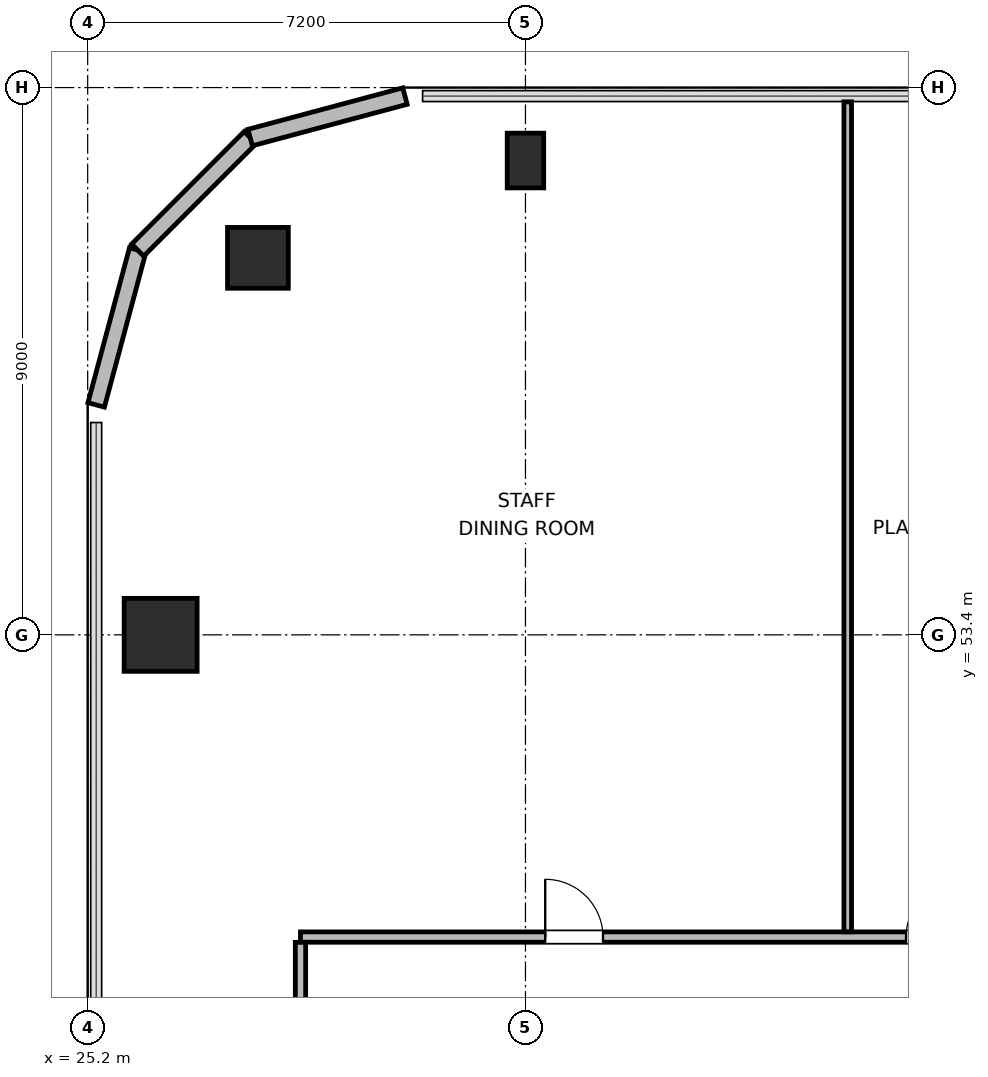
"""IFC4 building model, lengths in metres.
Left out: names, types, materials, properties, quantities, classifications, styles, units other than length and angle.
Written with IfcOpenShell. Run it as: python <this file> out.ifc"""

import sys

from ifc_helpers import new_model, si_unit, direction, frame, frame_2d, origin, origin_2d, place, context, subcontext, project, spatial, rectangle, circle, extrude, element, fill, save


model = new_model("IFC4")
c1 = context("Model", 3, precision=1e-05, world=origin(), true_north=direction((0.0, 1.0)))
c2 = subcontext(c1, "Body", "Model", "MODEL_VIEW")
j1 = project(units=[si_unit("LENGTHUNIT", "METRE"), si_unit("PLANEANGLEUNIT", "RADIAN")], contexts=[c1])
p1 = place(None, origin())
s1 = spatial("IfcSite", under=j1, at=p1, CompositionType="ELEMENT")
p2 = place(p1, origin())
s2 = spatial("IfcBuilding", under=s1, at=p2, CompositionType="ELEMENT")
p3 = place(p2, frame((0.0, 0.0, 223.2)))
s3 = spatial("IfcBuildingStorey", under=s2, at=p3, CompositionType="ELEMENT", Elevation=223.2)
p4 = place(p3, frame((28.0, 59.6, 0.0), z_axis=(0.0, 0.0, 1.0), x_axis=(1.0, 0.0, 0.0)))
e1 = element("IfcColumn", 1, at=p4, inside=s3, PredefinedType="COLUMN", context=c2, shape_type="SweptSolid", body=[
    extrude(circle(Radius=0.5, at=origin_2d()), origin(), (0.0, 0.0, 1.0), 3.9),
])
p5 = place(p3, frame((32.4, 61.2, 0.0), z_axis=(0.0, 0.0, 1.0), x_axis=(1.0, 0.0, 0.0)))
e2 = element("IfcColumn", 2, at=p5, inside=s3, PredefinedType="COLUMN", context=c2, shape_type="SweptSolid", body=[
    extrude(rectangle(XDim=0.6, YDim=0.9, at=origin_2d()), origin(), (0.0, 0.0, 1.0), 3.9),
])
p6 = place(p3, frame((26.4, 53.4, 0.0), z_axis=(0.0, 0.0, 1.0), x_axis=(1.0, 0.0, 0.0)))
e3 = element("IfcColumn", 3, at=p6, inside=s3, PredefinedType="COLUMN", context=c2, shape_type="SweptSolid", body=[
    extrude(rectangle(XDim=1.2, YDim=1.2, at=origin_2d()), origin(), (0.0, 0.0, 1.0), 3.9),
])
p7 = place(p3, frame((25.34, 57.182, 0.0), z_axis=(0.0, 0.0, 1.0), x_axis=(0.2588904131, 0.965906700466, 0.0)))
e4 = element("IfcWall", 4, at=p7, inside=s3, PredefinedType="SOLIDWALL", context=c2, shape_type="SweptSolid", body=[
    extrude(rectangle(XDim=2.636, YDim=0.28, at=frame_2d((1.318, 0.0))), origin(), (0.0, 0.0, 1.0), 3.68),
])
p8 = place(p3, frame((26.022, 59.728, 0.0), z_axis=(0.0, 0.0, 1.0), x_axis=(0.707153437963, 0.707060121331, 0.0)))
e5 = element("IfcWall", 5, at=p8, inside=s3, PredefinedType="SOLIDWALL", context=c2, shape_type="SweptSolid", body=[
    extrude(rectangle(XDim=2.616, YDim=0.28, at=frame_2d((1.308, 0.0))), origin(), (0.0, 0.0, 1.0), 3.68),
])
p9 = place(p3, frame((27.873, 61.577, 0.0), z_axis=(0.0, 0.0, 1.0), x_axis=(0.965883534663, 0.258976828051, 0.0)))
e6 = element("IfcWall", 6, at=p9, inside=s3, PredefinedType="SOLIDWALL", context=c2, shape_type="SweptSolid", body=[
    extrude(rectangle(XDim=2.636, YDim=0.28, at=frame_2d((1.318, 0.0))), origin(), (0.0, 0.0, 1.0), 3.68),
])
p10 = place(p3, frame((28.7, 48.43, 0.0), z_axis=(0.0, 0.0, 1.0), x_axis=(1.0, 0.0, 0.0)))
e7 = element("IfcWall", 7, at=p10, inside=s3, PredefinedType="PARTITIONING", context=c2, shape_type="SweptSolid", body=[
    extrude(rectangle(XDim=34.9, YDim=0.17, at=frame_2d((17.45, 0.0))), origin(), (0.0, 0.0, 1.0), 3.68),
])
p11 = place(p10, frame((4.025, 0.0, 0.0)))
e8 = element("IfcOpeningElement", 8, at=p11, cuts=e7, PredefinedType="OPENING", context=c2, shape_type="SweptSolid", body=[
    extrude(rectangle(XDim=0.95, YDim=2.04, at=frame_2d((0.475, 1.02))), frame((0.0, 0.095, 0.0), z_axis=(0.0, -1.0, 0.0), x_axis=(1.0, 0.0, 0.0)), (0.0, 0.0, 1.0), 0.19),
])
p12 = place(p10, frame((9.96, 0.0, 0.0)))
e9 = element("IfcOpeningElement", 9, at=p12, cuts=e7, PredefinedType="OPENING", context=c2, shape_type="SweptSolid", body=[
    extrude(rectangle(XDim=0.95, YDim=2.04, at=frame_2d((0.475, 1.02))), frame((0.0, 0.095, 0.0), z_axis=(0.0, -1.0, 0.0), x_axis=(1.0, 0.0, 0.0)), (0.0, 0.0, 1.0), 0.19),
])
p13 = place(p10, frame((15.94, 0.0, 0.0)))
e10 = element("IfcOpeningElement", 10, at=p13, cuts=e7, PredefinedType="OPENING", context=c2, shape_type="SweptSolid", body=[
    extrude(rectangle(XDim=0.95, YDim=2.04, at=frame_2d((0.475, 1.02))), frame((0.0, 0.095, 0.0), z_axis=(0.0, -1.0, 0.0), x_axis=(1.0, 0.0, 0.0)), (0.0, 0.0, 1.0), 0.19),
])
p14 = place(p10, frame((23.35, 0.0, 0.0)))
e11 = element("IfcOpeningElement", 11, at=p14, cuts=e7, PredefinedType="OPENING", context=c2, shape_type="SweptSolid", body=[
    extrude(rectangle(XDim=0.95, YDim=2.04, at=frame_2d((0.475, 1.02))), frame((0.0, 0.095, 0.0), z_axis=(0.0, -1.0, 0.0), x_axis=(1.0, 0.0, 0.0)), (0.0, 0.0, 1.0), 0.19),
])
p15 = place(p10, frame((30.32, 0.0, 0.0)))
e12 = element("IfcOpeningElement", 12, at=p15, cuts=e7, PredefinedType="OPENING", context=c2, shape_type="SweptSolid", body=[
    extrude(rectangle(XDim=0.95, YDim=2.04, at=frame_2d((0.475, 1.02))), frame((0.0, 0.095, 0.0), z_axis=(0.0, -1.0, 0.0), x_axis=(1.0, 0.0, 0.0)), (0.0, 0.0, 1.0), 0.19),
])
p16 = place(p3, frame((28.7, 23.657, 0.0), z_axis=(0.0, 0.0, 1.0), x_axis=(0.0, 1.0, 0.0)))
e13 = element("IfcWall", 13, at=p16, inside=s3, PredefinedType="PARTITIONING", context=c2, shape_type="SweptSolid", body=[
    extrude(rectangle(XDim=24.686, YDim=0.17, at=frame_2d((12.343, 0.0))), origin(), (0.0, 0.0, 1.0), 3.68),
])
p17 = place(p16, frame((4.353, 0.0, 0.0)))
e14 = element("IfcOpeningElement", 14, at=p17, cuts=e13, PredefinedType="OPENING", context=c2, shape_type="SweptSolid", body=[
    extrude(rectangle(XDim=0.95, YDim=2.04, at=frame_2d((0.475, 1.02))), frame((0.0, 0.095, 0.0), z_axis=(0.0, -1.0, 0.0), x_axis=(1.0, 0.0, 0.0)), (0.0, 0.0, 1.0), 0.19),
])
p18 = place(p16, frame((12.468, 0.0, 0.0)))
e15 = element("IfcOpeningElement", 15, at=p18, cuts=e13, PredefinedType="OPENING", context=c2, shape_type="SweptSolid", body=[
    extrude(rectangle(XDim=0.95, YDim=2.04, at=frame_2d((0.475, 1.02))), frame((0.0, 0.095, 0.0), z_axis=(0.0, -1.0, 0.0), x_axis=(1.0, 0.0, 0.0)), (0.0, 0.0, 1.0), 0.19),
])
p19 = place(p16, frame((19.983, 0.0, 0.0)))
e16 = element("IfcOpeningElement", 16, at=p19, cuts=e13, PredefinedType="OPENING", context=c2, shape_type="SweptSolid", body=[
    extrude(rectangle(XDim=0.95, YDim=2.04, at=frame_2d((0.475, 1.02))), frame((0.0, 0.095, 0.0), z_axis=(0.0, -1.0, 0.0), x_axis=(1.0, 0.0, 0.0)), (0.0, 0.0, 1.0), 0.19),
])
p20 = place(p3, frame((37.7, 48.517, 0.0), z_axis=(0.0, 0.0, 1.0), x_axis=(0.0, 1.0, 0.0)))
e17 = element("IfcWall", 17, at=p20, inside=s3, PredefinedType="PARTITIONING", context=c2, shape_type="SweptSolid", body=[
    extrude(rectangle(XDim=13.648, YDim=0.125, at=frame_2d((6.824, 0.0))), origin(), (0.0, 0.0, 1.0), 3.68),
])
p21 = place(p11, origin())
e18 = element("IfcDoor", 18, at=p21, inside=s3, OperationType="SINGLE_SWING_LEFT", PredefinedType="DOOR", context=c2, shape_type="SweptSolid", body=[
    extrude(rectangle(XDim=0.95, YDim=2.04, at=frame_2d((0.475, 1.02))), frame((0.0, 0.025, 0.0), z_axis=(0.0, -1.0, 0.0), x_axis=(1.0, 0.0, 0.0)), (0.0, 0.0, 1.0), 0.05),
])
fill(e8, e18)
p22 = place(p12, origin())
e19 = element("IfcDoor", 19, at=p22, inside=s3, OperationType="SINGLE_SWING_RIGHT", PredefinedType="DOOR", context=c2, shape_type="SweptSolid", body=[
    extrude(rectangle(XDim=0.95, YDim=2.04, at=frame_2d((0.475, 1.02))), frame((0.0, 0.025, 0.0), z_axis=(0.0, -1.0, 0.0), x_axis=(1.0, 0.0, 0.0)), (0.0, 0.0, 1.0), 0.05),
])
fill(e9, e19)
save(model, sys.argv[1])
